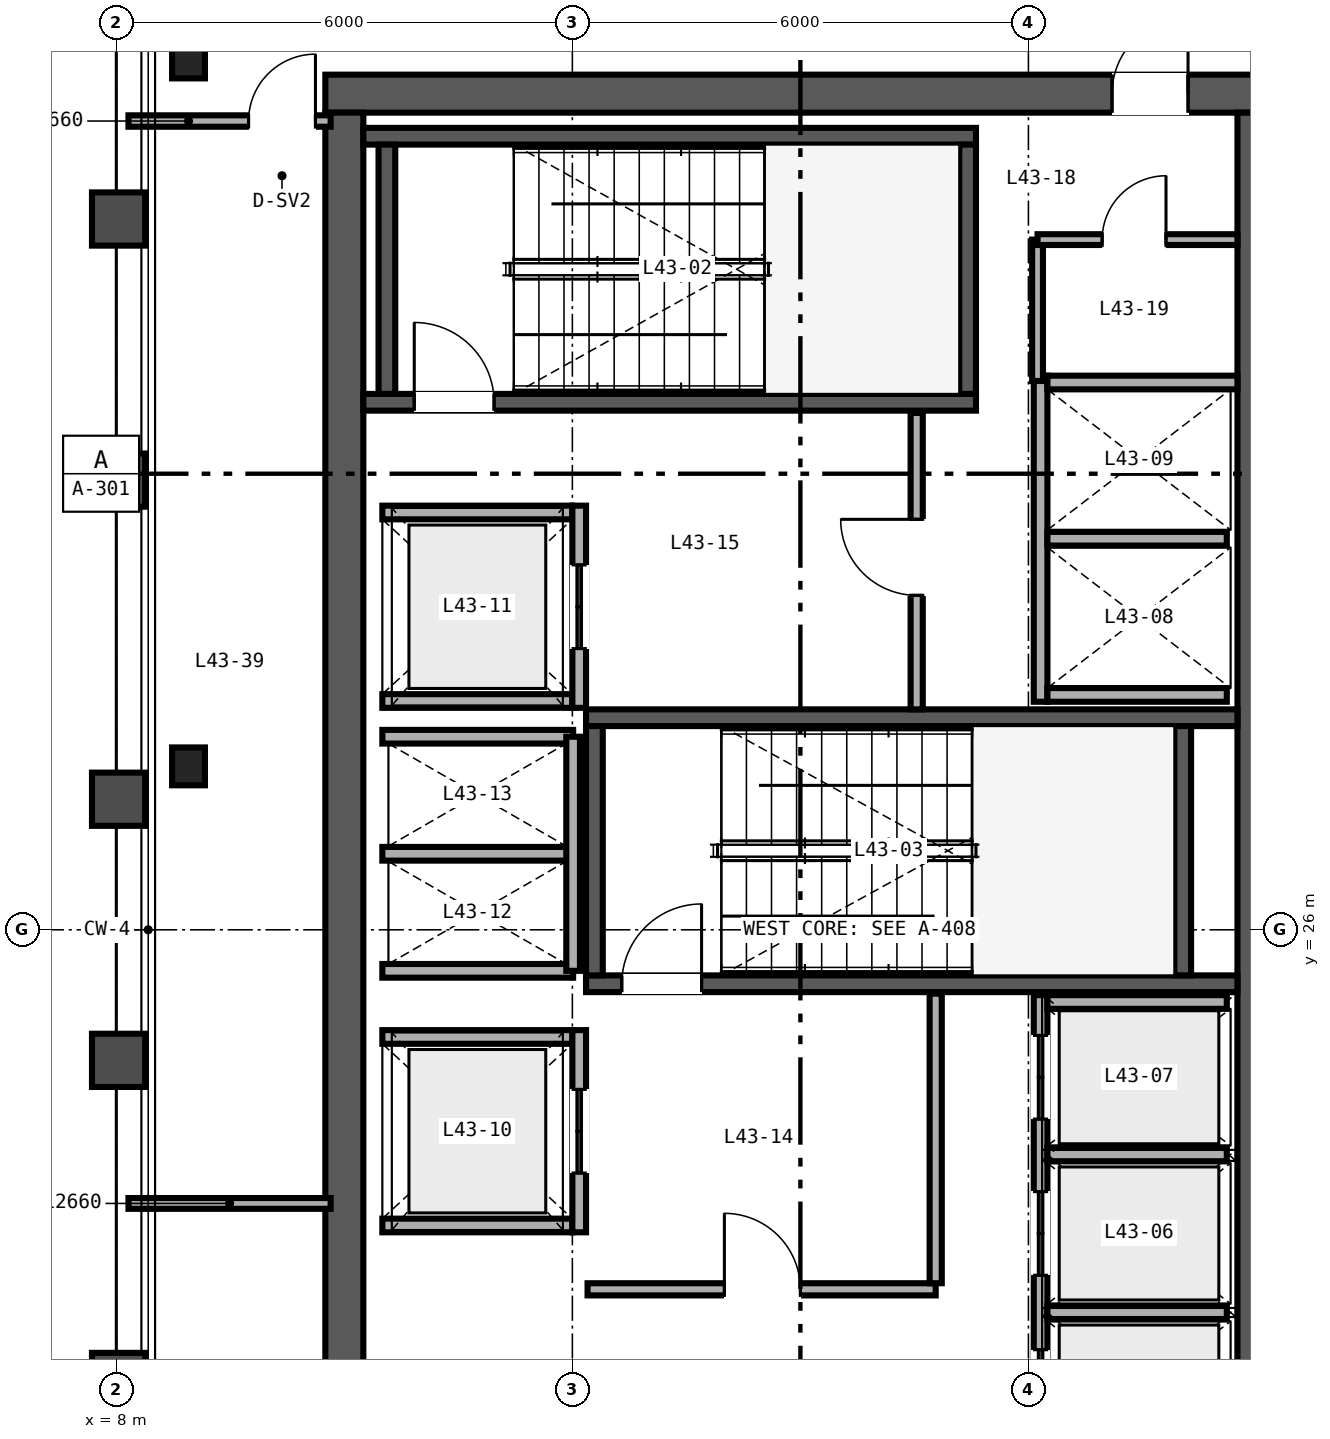
"""IFC4 building model, lengths in metres.
Left out: names, types, materials, properties, quantities, classifications, styles, units other than length and angle.
Written with IfcOpenShell. Run it as: python <this file> out.ifc"""

import sys

from ifc_helpers import new_model, si_unit, direction, frame, frame_2d, origin, origin_2d, place, context, subcontext, project, spatial, rectangle, i_section, extrude, source, transform, mapped, element, fill, save


model = new_model("IFC4")
c1 = context("Model", 3, precision=1e-05, world=origin(), true_north=direction((0.0, 1.0)))
c2 = subcontext(c1, "Body", "Model", "MODEL_VIEW")
j1 = project(units=[si_unit("LENGTHUNIT", "METRE"), si_unit("PLANEANGLEUNIT", "RADIAN")], contexts=[c1])
p1 = place(None, origin())
s1 = spatial("IfcSite", under=j1, at=p1, CompositionType="ELEMENT")
p2 = place(p1, origin())
s2 = spatial("IfcBuilding", under=s1, at=p2, CompositionType="ELEMENT")
p3 = place(p2, frame((0.0, 0.0, 174.0)))
s3 = spatial("IfcBuildingStorey", under=s2, at=p3, CompositionType="ELEMENT", Elevation=174.0)
p4 = place(p3, frame((10.75, 37.0, 0.0), z_axis=(0.0, 0.0, 1.0), x_axis=(1.0, 0.0, 0.0)))
e1 = element("IfcWall", 1, at=p4, inside=s3, PredefinedType="SHEAR", context=c2, shape_type="SweptSolid", body=[
    extrude(rectangle(XDim=12.5, YDim=0.5, at=frame_2d((6.25, 0.0))), origin(), (0.0, 0.0, 1.0), 3.37),
])
p5 = place(p4, frame((10.35, 0.0, 0.0)))
e2 = element("IfcOpeningElement", 2, at=p5, cuts=e1, PredefinedType="OPENING", context=c2, shape_type="SweptSolid", body=[
    extrude(rectangle(XDim=1.0, YDim=2.15, at=frame_2d((0.5, 1.075))), frame((0.0, 0.26, 0.0), z_axis=(0.0, -1.0, 0.0), x_axis=(1.0, 0.0, 0.0)), (0.0, 0.0, 1.0), 0.52),
])
for number, where, z_axis, x_axis in (
    (3, (11.0, 15.25, 0.0), (0.0, 0.0, 1.0), (0.0, 1.0, 0.0)),
    (4, (23.0, 15.25, 0.0), (0.0, 0.0, 1.0), (0.0, 1.0, 0.0)),
):
    element("IfcWall", number, at=place(p3, frame(where, z_axis=z_axis, x_axis=x_axis)), inside=s3, PredefinedType="SHEAR", context=c2, shape_type="SweptSolid", body=[
        extrude(rectangle(XDim=21.5, YDim=0.5, at=frame_2d((10.75, 0.0))), origin(), (0.0, 0.0, 1.0), 3.37),
    ])
p6 = place(p3, frame((11.25, 32.94, 0.0), z_axis=(0.0, 0.0, 1.0), x_axis=(1.0, 0.0, 0.0)))
e5 = element("IfcWall", 5, at=p6, inside=s3, PredefinedType="SHEAR", context=c2, shape_type="SweptSolid", body=[
    extrude(rectangle(XDim=8.06, YDim=0.22, at=frame_2d((4.03, 0.0))), origin(), (0.0, 0.0, 1.0), 3.4),
])
p7 = place(p6, frame((0.67, 0.0, 0.0)))
e6 = element("IfcOpeningElement", 6, at=p7, cuts=e5, PredefinedType="OPENING", context=c2, shape_type="SweptSolid", body=[
    extrude(rectangle(XDim=1.05, YDim=2.15, at=frame_2d((0.525, 1.075))), frame((0.0, 0.12, 0.0), z_axis=(0.0, -1.0, 0.0), x_axis=(1.0, 0.0, 0.0)), (0.0, 0.0, 1.0), 0.24),
])
p8 = place(p3, frame((11.25, 36.44, 0.0), z_axis=(0.0, 0.0, 1.0), x_axis=(1.0, 0.0, 0.0)))
e7 = element("IfcWall", 7, at=p8, inside=s3, PredefinedType="SHEAR", context=c2, shape_type="SweptSolid", body=[
    extrude(rectangle(XDim=8.06, YDim=0.22, at=frame_2d((4.03, 0.0))), origin(), (0.0, 0.0, 1.0), 3.4),
])
for number, where, z_axis, x_axis in (
    (8, (11.56, 33.05, 0.0), (0.0, 0.0, 1.0), (0.0, 1.0, 0.0)),
    (9, (19.2, 33.05, 0.0), (0.0, 0.0, 1.0), (0.0, 1.0, 0.0)),
):
    element("IfcWall", number, at=place(p3, frame(where, z_axis=z_axis, x_axis=x_axis)), inside=s3, PredefinedType="SHEAR", context=c2, shape_type="SweptSolid", body=[
        extrude(rectangle(XDim=3.28, YDim=0.22, at=frame_2d((1.64, 0.0))), origin(), (0.0, 0.0, 1.0), 3.4),
    ])
p9 = place(p3, frame((14.18, 25.29, 0.0), z_axis=(0.0, 0.0, 1.0), x_axis=(1.0, 0.0, 0.0)))
e10 = element("IfcWall", 10, at=p9, inside=s3, PredefinedType="SHEAR", context=c2, shape_type="SweptSolid", body=[
    extrude(rectangle(XDim=8.57, YDim=0.22, at=frame_2d((4.285, 0.0))), origin(), (0.0, 0.0, 1.0), 3.4),
])
p10 = place(p9, frame((0.47, 0.0, 0.0)))
e11 = element("IfcOpeningElement", 11, at=p10, cuts=e10, PredefinedType="OPENING", context=c2, shape_type="SweptSolid", body=[
    extrude(rectangle(XDim=1.05, YDim=2.15, at=frame_2d((0.525, 1.075))), frame((0.0, 0.12, 0.0), z_axis=(0.0, -1.0, 0.0), x_axis=(1.0, 0.0, 0.0)), (0.0, 0.0, 1.0), 0.24),
])
p11 = place(p3, frame((14.18, 28.79, 0.0), z_axis=(0.0, 0.0, 1.0), x_axis=(1.0, 0.0, 0.0)))
e12 = element("IfcWall", 12, at=p11, inside=s3, PredefinedType="SHEAR", context=c2, shape_type="SweptSolid", body=[
    extrude(rectangle(XDim=8.57, YDim=0.22, at=frame_2d((4.285, 0.0))), origin(), (0.0, 0.0, 1.0), 3.4),
])
for number, where, z_axis, x_axis in (
    (13, (14.29, 25.4, 0.0), (0.0, 0.0, 1.0), (0.0, 1.0, 0.0)),
    (14, (22.03, 25.4, 0.0), (0.0, 0.0, 1.0), (0.0, 1.0, 0.0)),
):
    element("IfcWall", number, at=place(p3, frame(where, z_axis=z_axis, x_axis=x_axis)), inside=s3, PredefinedType="SHEAR", context=c2, shape_type="SweptSolid", body=[
        extrude(rectangle(XDim=3.28, YDim=0.22, at=frame_2d((1.64, 0.0))), origin(), (0.0, 0.0, 1.0), 3.4),
    ])
m1 = source(origin(), c2, "Body", "SweptSolid", [
    extrude(i_section(OverallWidth=0.432, OverallDepth=0.498, WebThickness=0.056, FlangeThickness=0.089, FilletRadius=0.025, at=origin_2d()), origin(), (0.0, 0.0, 1.0), 3.37),
])
for number, where, z_axis, x_axis in (
    (15, (8.95, 28.15, 0.0), (0.0, 0.0, 1.0), (1.0, 0.0, 0.0)),
    (16, (8.95, 37.45, 0.0), (0.0, 0.0, 1.0), (1.0, 0.0, 0.0)),
):
    element("IfcColumn", number, at=place(p3, frame(where, z_axis=z_axis, x_axis=x_axis)), inside=s3, PredefinedType="COLUMN", context=c2, shape_type="MappedRepresentation", body=[
        mapped(m1, transform((0.0, 0.0, 0.0), scale=1.0)),
    ])
p12 = place(p3, frame((20.16, 18.82, 0.0), z_axis=(0.0, 0.0, 1.0), x_axis=(0.0, 1.0, 0.0)))
e17 = element("IfcWall", 17, at=p12, inside=s3, PredefinedType="SOLIDWALL", context=c2, shape_type="SweptSolid", body=[
    extrude(rectangle(XDim=6.32, YDim=0.18, at=frame_2d((3.16, 0.0))), origin(), (0.0, 0.0, 1.0), 2.47),
])
p13 = place(p12, frame((0.555, 0.0, 0.0)))
e18 = element("IfcOpeningElement", 18, at=p13, cuts=e17, PredefinedType="OPENING", context=c2, shape_type="SweptSolid", body=[
    extrude(rectangle(XDim=1.1, YDim=2.2, at=frame_2d((0.55, 1.1))), frame((0.0, 0.1, 0.0), z_axis=(0.0, -1.0, 0.0), x_axis=(1.0, 0.0, 0.0)), (0.0, 0.0, 1.0), 0.2),
])
p14 = place(p12, frame((2.635, 0.0, 0.0)))
e19 = element("IfcOpeningElement", 19, at=p14, cuts=e17, PredefinedType="OPENING", context=c2, shape_type="SweptSolid", body=[
    extrude(rectangle(XDim=1.1, YDim=2.2, at=frame_2d((0.55, 1.1))), frame((0.0, 0.1, 0.0), z_axis=(0.0, -1.0, 0.0), x_axis=(1.0, 0.0, 0.0)), (0.0, 0.0, 1.0), 0.2),
])
p15 = place(p12, frame((4.69, 0.0, 0.0)))
e20 = element("IfcOpeningElement", 20, at=p15, cuts=e17, PredefinedType="OPENING", context=c2, shape_type="SweptSolid", body=[
    extrude(rectangle(XDim=1.1, YDim=2.2, at=frame_2d((0.55, 1.1))), frame((0.0, 0.1, 0.0), z_axis=(0.0, -1.0, 0.0), x_axis=(1.0, 0.0, 0.0)), (0.0, 0.0, 1.0), 0.2),
])
p16 = place(p3, frame((20.25, 25.05, 0.0), z_axis=(0.0, 0.0, 1.0), x_axis=(1.0, 0.0, 0.0)))
e21 = element("IfcWall", 21, at=p16, inside=s3, PredefinedType="SOLIDWALL", context=c2, shape_type="SweptSolid", body=[
    extrude(rectangle(XDim=2.36, YDim=0.18, at=frame_2d((1.18, 0.0))), origin(), (0.0, 0.0, 1.0), 3.37),
])
p17 = place(p3, frame((20.25, 20.965, 0.0), z_axis=(0.0, 0.0, 1.0), x_axis=(1.0, 0.0, 0.0)))
e22 = element("IfcWall", 22, at=p17, inside=s3, PredefinedType="SOLIDWALL", context=c2, shape_type="SweptSolid", body=[
    extrude(rectangle(XDim=2.36, YDim=0.18, at=frame_2d((1.18, 0.0))), origin(), (0.0, 0.0, 1.0), 2.47),
])
p18 = place(p3, frame((20.25, 23.045, 0.0), z_axis=(0.0, 0.0, 1.0), x_axis=(1.0, 0.0, 0.0)))
e23 = element("IfcWall", 23, at=p18, inside=s3, PredefinedType="SOLIDWALL", context=c2, shape_type="SweptSolid", body=[
    extrude(rectangle(XDim=2.36, YDim=0.18, at=frame_2d((1.18, 0.0))), origin(), (0.0, 0.0, 1.0), 3.37),
])
p19 = place(p3, frame((20.16, 29.0, 0.0), z_axis=(0.0, 0.0, 1.0), x_axis=(0.0, 1.0, 0.0)))
e24 = element("IfcWall", 24, at=p19, inside=s3, PredefinedType="SOLIDWALL", context=c2, shape_type="SweptSolid", body=[
    extrude(rectangle(XDim=4.29, YDim=0.18, at=frame_2d((2.145, 0.0))), origin(), (0.0, 0.0, 1.0), 3.37),
])
p20 = place(p3, frame((20.25, 29.09, 0.0), z_axis=(0.0, 0.0, 1.0), x_axis=(1.0, 0.0, 0.0)))
e25 = element("IfcWall", 25, at=p20, inside=s3, PredefinedType="SOLIDWALL", context=c2, shape_type="SweptSolid", body=[
    extrude(rectangle(XDim=2.36, YDim=0.18, at=frame_2d((1.18, 0.0))), origin(), (0.0, 0.0, 1.0), 3.37),
])
p21 = place(p3, frame((20.25, 33.2, 0.0), z_axis=(0.0, 0.0, 1.0), x_axis=(1.0, 0.0, 0.0)))
e26 = element("IfcWall", 26, at=p21, inside=s3, PredefinedType="SOLIDWALL", context=c2, shape_type="SweptSolid", body=[
    extrude(rectangle(XDim=2.5, YDim=0.18, at=frame_2d((1.25, 0.0))), origin(), (0.0, 0.0, 1.0), 3.37),
])
p22 = place(p3, frame((20.25, 31.145, 0.0), z_axis=(0.0, 0.0, 1.0), x_axis=(1.0, 0.0, 0.0)))
e27 = element("IfcWall", 27, at=p22, inside=s3, PredefinedType="SOLIDWALL", context=c2, shape_type="SweptSolid", body=[
    extrude(rectangle(XDim=2.36, YDim=0.18, at=frame_2d((1.18, 0.0))), origin(), (0.0, 0.0, 1.0), 3.37),
])
for number, where, z_axis, x_axis in (
    (28, (11.5, 22.11, 0.0), (0.0, 0.0, 1.0), (1.0, 0.0, 0.0)),
    (29, (11.5, 24.59, 0.0), (0.0, 0.0, 1.0), (1.0, 0.0, 0.0)),
):
    element("IfcWall", number, at=place(p3, frame(where, z_axis=z_axis, x_axis=x_axis)), inside=s3, PredefinedType="SOLIDWALL", context=c2, shape_type="SweptSolid", body=[
        extrude(rectangle(XDim=2.5, YDim=0.18, at=frame_2d((1.25, 0.0))), origin(), (0.0, 0.0, 1.0), 3.37),
    ])
p23 = place(p3, frame((14.09, 22.02, 0.0), z_axis=(0.0, 0.0, 1.0), x_axis=(0.0, 1.0, 0.0)))
e30 = element("IfcWall", 30, at=p23, inside=s3, PredefinedType="SOLIDWALL", context=c2, shape_type="SweptSolid", body=[
    extrude(rectangle(XDim=2.66, YDim=0.18, at=frame_2d((1.33, 0.0))), origin(), (0.0, 0.0, 1.0), 3.37),
])
p24 = place(p23, frame((0.78, 0.0, 0.0)))
e31 = element("IfcOpeningElement", 31, at=p24, cuts=e30, PredefinedType="OPENING", context=c2, shape_type="SweptSolid", body=[
    extrude(rectangle(XDim=1.1, YDim=2.2, at=frame_2d((0.55, 1.1))), frame((0.0, 0.1, 0.0), z_axis=(0.0, -1.0, 0.0), x_axis=(1.0, 0.0, 0.0)), (0.0, 0.0, 1.0), 0.2),
])
for number, where, z_axis, x_axis in (
    (32, (11.5, 29.01, 0.0), (0.0, 0.0, 1.0), (1.0, 0.0, 0.0)),
    (33, (11.5, 31.49, 0.0), (0.0, 0.0, 1.0), (1.0, 0.0, 0.0)),
):
    element("IfcWall", number, at=place(p3, frame(where, z_axis=z_axis, x_axis=x_axis)), inside=s3, PredefinedType="SOLIDWALL", context=c2, shape_type="SweptSolid", body=[
        extrude(rectangle(XDim=2.5, YDim=0.18, at=frame_2d((1.25, 0.0))), origin(), (0.0, 0.0, 1.0), 3.37),
    ])
p25 = place(p3, frame((14.09, 28.92, 0.0), z_axis=(0.0, 0.0, 1.0), x_axis=(0.0, 1.0, 0.0)))
e34 = element("IfcWall", 34, at=p25, inside=s3, PredefinedType="SOLIDWALL", context=c2, shape_type="SweptSolid", body=[
    extrude(rectangle(XDim=2.66, YDim=0.18, at=frame_2d((1.33, 0.0))), origin(), (0.0, 0.0, 1.0), 3.37),
])
p26 = place(p25, frame((0.78, 0.0, 0.0)))
e35 = element("IfcOpeningElement", 35, at=p26, cuts=e34, PredefinedType="OPENING", context=c2, shape_type="SweptSolid", body=[
    extrude(rectangle(XDim=1.1, YDim=2.2, at=frame_2d((0.55, 1.1))), frame((0.0, 0.1, 0.0), z_axis=(0.0, -1.0, 0.0), x_axis=(1.0, 0.0, 0.0)), (0.0, 0.0, 1.0), 0.2),
])
for number, where, z_axis, x_axis in (
    (36, (11.5, 25.46, 0.0), (0.0, 0.0, 1.0), (1.0, 0.0, 0.0)),
    (37, (11.5, 27.0, 0.0), (0.0, 0.0, 1.0), (1.0, 0.0, 0.0)),
    (38, (11.5, 28.54, 0.0), (0.0, 0.0, 1.0), (1.0, 0.0, 0.0)),
):
    element("IfcWall", number, at=place(p3, frame(where, z_axis=z_axis, x_axis=x_axis)), inside=s3, PredefinedType="SOLIDWALL", context=c2, shape_type="SweptSolid", body=[
        extrude(rectangle(XDim=2.51, YDim=0.18, at=frame_2d((1.255, 0.0))), origin(), (0.0, 0.0, 1.0), 3.37),
    ])
p27 = place(p3, frame((14.01, 25.46, 0.0), z_axis=(0.0, 0.0, 1.0), x_axis=(0.0, 1.0, 0.0)))
e39 = element("IfcWall", 39, at=p27, inside=s3, PredefinedType="SOLIDWALL", context=c2, shape_type="SweptSolid", body=[
    extrude(rectangle(XDim=3.08, YDim=0.18, at=frame_2d((1.54, 0.0))), origin(), (0.0, 0.0, 1.0), 3.37),
])
p28 = place(p3, frame((14.2, 21.27, 0.0), z_axis=(0.0, 0.0, 1.0), x_axis=(1.0, 0.0, 0.0)))
e40 = element("IfcWall", 40, at=p28, inside=s3, PredefinedType="PARTITIONING", context=c2, shape_type="SweptSolid", body=[
    extrude(rectangle(XDim=4.58, YDim=0.16, at=frame_2d((2.29, 0.0))), origin(), (0.0, 0.0, 1.0), 3.37),
])
p29 = place(p28, frame((1.8, 0.0, 0.0)))
e41 = element("IfcOpeningElement", 41, at=p29, cuts=e40, PredefinedType="OPENING", context=c2, shape_type="SweptSolid", body=[
    extrude(rectangle(XDim=1.0, YDim=2.15, at=frame_2d((0.5, 1.075))), frame((0.0, 0.09, 0.0), z_axis=(0.0, -1.0, 0.0), x_axis=(1.0, 0.0, 0.0)), (0.0, 0.0, 1.0), 0.18),
])
p30 = place(p3, frame((18.78, 21.35, 0.0), z_axis=(0.0, 0.0, 1.0), x_axis=(0.0, 1.0, 0.0)))
e42 = element("IfcWall", 42, at=p30, inside=s3, PredefinedType="PARTITIONING", context=c2, shape_type="SweptSolid", body=[
    extrude(rectangle(XDim=3.81, YDim=0.16, at=frame_2d((1.905, 0.0))), origin(), (0.0, 0.0, 1.0), 3.37),
])
p31 = place(p3, frame((18.53, 28.9, 0.0), z_axis=(0.0, 0.0, 1.0), x_axis=(0.0, 1.0, 0.0)))
e43 = element("IfcWall", 43, at=p31, inside=s3, PredefinedType="PARTITIONING", context=c2, shape_type="SweptSolid", body=[
    extrude(rectangle(XDim=3.9, YDim=0.16, at=frame_2d((1.95, 0.0))), origin(), (0.0, 0.0, 1.0), 3.37),
])
p32 = place(p31, frame((1.5, 0.0, 0.0)))
e44 = element("IfcOpeningElement", 44, at=p32, cuts=e43, PredefinedType="OPENING", context=c2, shape_type="SweptSolid", body=[
    extrude(rectangle(XDim=1.0, YDim=2.15, at=frame_2d((0.5, 1.075))), frame((0.0, 0.09, 0.0), z_axis=(0.0, -1.0, 0.0), x_axis=(1.0, 0.0, 0.0)), (0.0, 0.0, 1.0), 0.18),
])
p33 = place(p3, frame((20.12, 33.22, 0.0), z_axis=(0.0, 0.0, 1.0), x_axis=(0.0, 1.0, 0.0)))
e45 = element("IfcWall", 45, at=p33, inside=s3, PredefinedType="PARTITIONING", context=c2, shape_type="SweptSolid", body=[
    extrude(rectangle(XDim=1.86, YDim=0.142, at=frame_2d((0.93, 0.0))), origin(), (0.0, 0.0, 1.0), 3.37),
])
p34 = place(p3, frame((20.12, 35.08, 0.0), z_axis=(0.0, 0.0, 1.0), x_axis=(1.0, 0.0, 0.0)))
e46 = element("IfcWall", 46, at=p34, inside=s3, PredefinedType="PARTITIONING", context=c2, shape_type="SweptSolid", body=[
    extrude(rectangle(XDim=2.63, YDim=0.142, at=frame_2d((1.315, 0.0))), origin(), (0.0, 0.0, 1.0), 3.37),
])
p35 = place(p34, frame((0.85, 0.0, 0.0)))
e47 = element("IfcOpeningElement", 47, at=p35, cuts=e46, PredefinedType="OPENING", context=c2, shape_type="SweptSolid", body=[
    extrude(rectangle(XDim=0.84, YDim=2.1, at=frame_2d((0.42, 1.05))), frame((0.0, 0.081, 0.0), z_axis=(0.0, -1.0, 0.0), x_axis=(1.0, 0.0, 0.0)), (0.0, 0.0, 1.0), 0.162),
])
p36 = place(p3, frame((8.16, 36.64, 0.0), z_axis=(0.0, 0.0, 1.0), x_axis=(1.0, 0.0, 0.0)))
e48 = element("IfcWall", 48, at=p36, inside=s3, PredefinedType="PARTITIONING", context=c2, shape_type="SweptSolid", body=[
    extrude(rectangle(XDim=2.66, YDim=0.15, at=frame_2d((1.33, 0.0))), origin(), (0.0, 0.0, 1.0), 2.753),
])
p37 = place(p36, frame((1.58, 0.0, 0.0)))
e49 = element("IfcOpeningElement", 49, at=p37, cuts=e48, PredefinedType="OPENING", context=c2, shape_type="SweptSolid", body=[
    extrude(rectangle(XDim=0.88, YDim=2.15, at=frame_2d((0.44, 1.075))), frame((0.0, 0.085, 0.0), z_axis=(0.0, -1.0, 0.0), x_axis=(1.0, 0.0, 0.0)), (0.0, 0.0, 1.0), 0.17),
])
p38 = place(p3, frame((8.16, 22.4, 0.0), z_axis=(0.0, 0.0, 1.0), x_axis=(1.0, 0.0, 0.0)))
e50 = element("IfcWall", 50, at=p38, inside=s3, PredefinedType="PARTITIONING", context=c2, shape_type="SweptSolid", body=[
    extrude(rectangle(XDim=2.66, YDim=0.142, at=frame_2d((1.33, 0.0))), origin(), (0.0, 0.0, 1.0), 2.591),
])
m2 = source(origin(), c2, "Body", "SweptSolid", [
    extrude(rectangle(XDim=1.05, YDim=2.15, at=frame_2d((0.525, 1.075))), frame((0.0, 0.025, 0.0), z_axis=(0.0, -1.0, 0.0), x_axis=(1.0, 0.0, 0.0)), (0.0, 0.0, 1.0), 0.05),
])
p39 = place(p7, origin())
e51 = element("IfcDoor", 51, at=p39, inside=s3, OperationType="SINGLE_SWING_LEFT", PredefinedType="DOOR", context=c2, shape_type="MappedRepresentation", body=[
    mapped(m2, transform((0.0, 0.0, 0.0), scale=1.0)),
])
fill(e6, e51)
p40 = place(p10, origin())
e52 = element("IfcDoor", 52, at=p40, inside=s3, OperationType="SINGLE_SWING_RIGHT", PredefinedType="DOOR", context=c2, shape_type="MappedRepresentation", body=[
    mapped(m2, transform((0.0, 0.0, 0.0), scale=1.0)),
])
fill(e11, e52)
m3 = source(origin(), c2, "Body", "SweptSolid", [
    extrude(rectangle(XDim=1.1, YDim=2.2, at=frame_2d((0.55, 1.1))), frame((0.0, 0.025, 0.0), z_axis=(0.0, -1.0, 0.0), x_axis=(1.0, 0.0, 0.0)), (0.0, 0.0, 1.0), 0.05),
])
p41 = place(p13, origin())
e53 = element("IfcDoor", 53, at=p41, inside=s3, OperationType="DOUBLE_DOOR_SLIDING", PredefinedType="DOOR", context=c2, shape_type="MappedRepresentation", body=[
    mapped(m3, transform((0.0, 0.0, 0.0), scale=1.0)),
])
fill(e18, e53)
p42 = place(p14, origin())
e54 = element("IfcDoor", 54, at=p42, inside=s3, OperationType="DOUBLE_DOOR_SLIDING", PredefinedType="DOOR", context=c2, shape_type="MappedRepresentation", body=[
    mapped(m3, transform((0.0, 0.0, 0.0), scale=1.0)),
])
fill(e19, e54)
p43 = place(p15, origin())
e55 = element("IfcDoor", 55, at=p43, inside=s3, OperationType="DOUBLE_DOOR_SLIDING", PredefinedType="DOOR", context=c2, shape_type="MappedRepresentation", body=[
    mapped(m3, transform((0.0, 0.0, 0.0), scale=1.0)),
])
fill(e20, e55)
p44 = place(p24, origin())
e56 = element("IfcDoor", 56, at=p44, inside=s3, OperationType="DOUBLE_DOOR_SLIDING", PredefinedType="DOOR", context=c2, shape_type="MappedRepresentation", body=[
    mapped(m3, transform((0.0, 0.0, 0.0), scale=1.0)),
])
fill(e31, e56)
p45 = place(p26, origin())
e57 = element("IfcDoor", 57, at=p45, inside=s3, OperationType="DOUBLE_DOOR_SLIDING", PredefinedType="DOOR", context=c2, shape_type="MappedRepresentation", body=[
    mapped(m3, transform((0.0, 0.0, 0.0), scale=1.0)),
])
fill(e35, e57)
m4 = source(origin(), c2, "Body", "SweptSolid", [
    extrude(rectangle(XDim=1.0, YDim=2.15, at=frame_2d((0.5, 1.075))), frame((0.0, 0.025, 0.0), z_axis=(0.0, -1.0, 0.0), x_axis=(1.0, 0.0, 0.0)), (0.0, 0.0, 1.0), 0.05),
])
p46 = place(p29, origin())
e58 = element("IfcDoor", 58, at=p46, inside=s3, OperationType="SINGLE_SWING_LEFT", PredefinedType="DOOR", context=c2, shape_type="MappedRepresentation", body=[
    mapped(m4, transform((0.0, 0.0, 0.0), scale=1.0)),
])
fill(e41, e58)
p47 = place(p32, origin())
e59 = element("IfcDoor", 59, at=p47, inside=s3, OperationType="SINGLE_SWING_RIGHT", PredefinedType="DOOR", context=c2, shape_type="MappedRepresentation", body=[
    mapped(m4, transform((0.0, 0.0, 0.0), scale=1.0)),
])
fill(e44, e59)
m5 = source(origin(), c2, "Body", "SweptSolid", [
    extrude(rectangle(XDim=0.84, YDim=2.1, at=frame_2d((0.42, 1.05))), frame((0.0, 0.025, 0.0), z_axis=(0.0, -1.0, 0.0), x_axis=(1.0, 0.0, 0.0)), (0.0, 0.0, 1.0), 0.05),
])
p48 = place(p35, origin())
e60 = element("IfcDoor", 60, at=p48, inside=s3, OperationType="SINGLE_SWING_RIGHT", PredefinedType="DOOR", context=c2, shape_type="MappedRepresentation", body=[
    mapped(m5, transform((0.0, 0.0, 0.0), scale=1.0)),
])
fill(e47, e60)
p49 = place(p5, origin())
e61 = element("IfcDoor", 61, at=p49, inside=s3, OperationType="SINGLE_SWING_RIGHT", PredefinedType="DOOR", context=c2, shape_type="MappedRepresentation", body=[
    mapped(m4, transform((0.0, 0.0, 0.0), scale=1.0)),
])
fill(e2, e61)
m6 = source(origin(), c2, "Body", "SweptSolid", [
    extrude(rectangle(XDim=0.88, YDim=2.15, at=frame_2d((0.44, 1.075))), frame((0.0, 0.025, 0.0), z_axis=(0.0, -1.0, 0.0), x_axis=(1.0, 0.0, 0.0)), (0.0, 0.0, 1.0), 0.05),
])
p50 = place(p37, origin())
e62 = element("IfcDoor", 62, at=p50, inside=s3, OperationType="SINGLE_SWING_RIGHT", PredefinedType="DOOR", context=c2, shape_type="MappedRepresentation", body=[
    mapped(m6, transform((0.0, 0.0, 0.0), scale=1.0)),
])
fill(e49, e62)
save(model, sys.argv[1])
